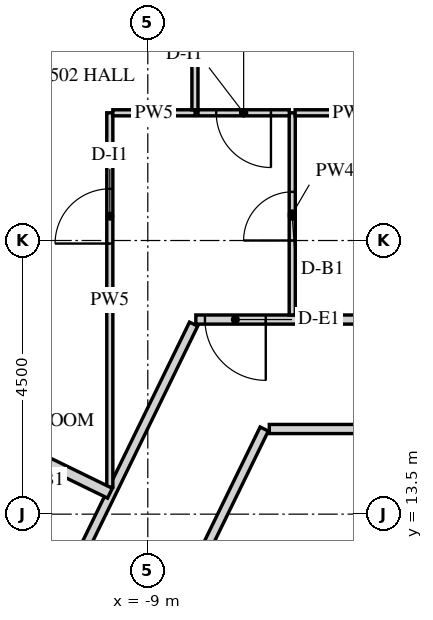
"""IFC4 building model, lengths in metres.
Left out: names, types, materials, properties, quantities, classifications, styles, units other than length and angle.
Written with IfcOpenShell. Run it as: python <this file> out.ifc"""

import sys

from ifc_helpers import new_model, si_unit, direction, frame, frame_2d, origin, place, context, subcontext, project, spatial, rectangle, extrude, element, fill, save


model = new_model("IFC4")
c1 = context("Model", 3, precision=1e-05, world=origin(), true_north=direction((0.0, 1.0)))
c2 = subcontext(c1, "Body", "Model", "MODEL_VIEW")
j1 = project(units=[si_unit("LENGTHUNIT", "METRE"), si_unit("PLANEANGLEUNIT", "RADIAN")], contexts=[c1])
p1 = place(None, origin())
s1 = spatial("IfcSite", under=j1, at=p1, CompositionType="ELEMENT")
p2 = place(p1, origin())
s2 = spatial("IfcBuilding", under=s1, at=p2, CompositionType="ELEMENT")
p3 = place(p2, frame((0.0, 0.0, 314.7)))
s3 = spatial("IfcBuildingStorey", under=s2, at=p3, CompositionType="ELEMENT", Elevation=314.7)
p4 = place(p3, frame((6.467, 16.7, 0.0), z_axis=(0.0, 0.0, 1.0), x_axis=(-1.0, 0.0, 0.0)))
e1 = element("IfcWall", 1, at=p4, inside=s3, PredefinedType="PARTITIONING", context=c2, shape_type="SweptSolid", body=[
    extrude(rectangle(XDim=14.677, YDim=0.15, at=frame_2d((7.339, 0.0))), origin(), (0.0, 0.0, 1.0), 2.988),
])
p5 = place(p4, frame((0.4, 0.0, 0.0)))
e2 = element("IfcOpeningElement", 2, at=p5, cuts=e1, PredefinedType="OPENING", context=c2, shape_type="SweptSolid", body=[
    extrude(rectangle(XDim=1.0, YDim=2.1, at=frame_2d((0.5, 1.05))), frame((0.0, 0.085, 0.0), z_axis=(0.0, -1.0, 0.0), x_axis=(1.0, 0.0, 0.0)), (0.0, 0.0, 1.0), 0.17),
])
p6 = place(p4, frame((13.527, 0.0, 0.0)))
e3 = element("IfcOpeningElement", 3, at=p6, cuts=e1, PredefinedType="OPENING", context=c2, shape_type="SweptSolid", body=[
    extrude(rectangle(XDim=1.0, YDim=2.1, at=frame_2d((0.5, 1.05))), frame((0.0, 0.085, 0.0), z_axis=(0.0, -1.0, 0.0), x_axis=(1.0, 0.0, 0.0)), (0.0, 0.0, 1.0), 0.17),
])
p7 = place(p3, frame((-8.247, 16.625, 0.0), z_axis=(0.0, 0.0, 1.0), x_axis=(-0.438381655451, -0.898788920806, 0.0)))
e4 = element("IfcWall", 4, at=p7, inside=s3, PredefinedType="PARTITIONING", context=c2, shape_type="SweptSolid", body=[
    extrude(rectangle(XDim=16.272, YDim=0.15, at=frame_2d((8.136, 0.0))), origin(), (0.0, 0.0, 1.0), 2.988),
])
p8 = place(p7, frame((5.703, 0.0, 0.0)))
e5 = element("IfcOpeningElement", 5, at=p8, cuts=e4, PredefinedType="OPENING", context=c2, shape_type="SweptSolid", body=[
    extrude(rectangle(XDim=1.0, YDim=2.1, at=frame_2d((0.5, 1.05))), frame((0.0, 0.085, 0.0), z_axis=(0.0, -1.0, 0.0), x_axis=(1.0, 0.0, 0.0)), (0.0, 0.0, 1.0), 0.17),
])
p9 = place(p3, frame((-10.717, 7.453, 0.0), z_axis=(0.0, 0.0, 1.0), x_axis=(0.438363251035, 0.898797897273, 0.0)))
e6 = element("IfcWall", 6, at=p9, inside=s3, PredefinedType="PARTITIONING", context=c2, shape_type="SweptSolid", body=[
    extrude(rectangle(XDim=8.285, YDim=0.15, at=frame_2d((4.143, 0.0))), origin(), (0.0, 0.0, 1.0), 2.988),
])
p10 = place(p3, frame((-7.002, 14.9, 0.0), z_axis=(0.0, 0.0, 1.0), x_axis=(1.0, 0.0, 0.0)))
e7 = element("IfcWall", 7, at=p10, inside=s3, PredefinedType="PARTITIONING", context=c2, shape_type="SweptSolid", body=[
    extrude(rectangle(XDim=12.512, YDim=0.15, at=frame_2d((6.256, 0.0))), origin(), (0.0, 0.0, 1.0), 2.988),
])
p11 = place(p10, frame((5.806, 0.0, 0.0)))
e8 = element("IfcOpeningElement", 8, at=p11, cuts=e7, PredefinedType="OPENING", context=c2, shape_type="SweptSolid", body=[
    extrude(rectangle(XDim=0.9, YDim=2.1, at=frame_2d((0.45, 1.05))), frame((0.0, 0.085, 0.0), z_axis=(0.0, -1.0, 0.0), x_axis=(1.0, 0.0, 0.0)), (0.0, 0.0, 1.0), 0.17),
])
p12 = place(p3, frame((-9.625, 13.945, 0.0), z_axis=(0.0, 0.0, 1.0), x_axis=(0.0, 1.0, 0.0)))
e9 = element("IfcWall", 9, at=p12, inside=s3, PredefinedType="PARTITIONING", context=c2, shape_type="SweptSolid", body=[
    extrude(rectangle(XDim=6.155, YDim=0.1, at=frame_2d((3.077, 0.0))), origin(), (0.0, 0.0, 1.0), 2.988),
])
p13 = place(p12, frame((4.005, 0.0, 0.0)))
e10 = element("IfcOpeningElement", 10, at=p13, cuts=e9, PredefinedType="OPENING", context=c2, shape_type="SweptSolid", body=[
    extrude(rectangle(XDim=0.9, YDim=2.1, at=frame_2d((0.45, 1.05))), frame((0.0, 0.06, 0.0), z_axis=(0.0, -1.0, 0.0), x_axis=(1.0, 0.0, 0.0)), (0.0, 0.0, 1.0), 0.12),
])
p14 = place(p3, frame((-9.575, 20.1, 0.0), z_axis=(0.0, 0.0, 1.0), x_axis=(1.0, 0.0, 0.0)))
e11 = element("IfcWall", 11, at=p14, inside=s3, PredefinedType="PARTITIONING", context=c2, shape_type="SweptSolid", body=[
    extrude(rectangle(XDim=1.352, YDim=0.1, at=frame_2d((0.676, 0.0))), origin(), (0.0, 0.0, 1.0), 2.988),
])
p15 = place(p3, frame((-8.225, 20.15, 0.0), z_axis=(0.0, 0.0, 1.0), x_axis=(0.0, 1.0, 0.0)))
e12 = element("IfcWall", 12, at=p15, inside=s3, PredefinedType="PARTITIONING", context=c2, shape_type="SweptSolid", body=[
    extrude(rectangle(XDim=5.35, YDim=0.1, at=frame_2d((2.675, 0.0))), origin(), (0.0, 0.0, 1.0), 2.988),
])
p16 = place(p3, frame((-17.516, 17.694, 0.0), z_axis=(0.0, 0.0, 1.0), x_axis=(0.898787414812, -0.438384743092, 0.0)))
e13 = element("IfcWall", 13, at=p16, inside=s3, PredefinedType="PARTITIONING", context=c2, shape_type="SweptSolid", body=[
    extrude(rectangle(XDim=8.782, YDim=0.18, at=frame_2d((4.391, 0.0))), origin(), (0.0, 0.0, 1.0), 2.988),
])
p17 = place(p3, frame((-6.625, 16.775, 0.0), z_axis=(0.0, 0.0, 1.0), x_axis=(0.0, 1.0, 0.0)))
e14 = element("IfcWall", 14, at=p17, inside=s3, PredefinedType="PARTITIONING", context=c2, shape_type="SweptSolid", body=[
    extrude(rectangle(XDim=3.325, YDim=0.1, at=frame_2d((1.663, 0.0))), origin(), (0.0, 0.0, 1.0), 2.988),
])
p18 = place(p17, frame((1.225, 0.0, 0.0)))
e15 = element("IfcOpeningElement", 15, at=p18, cuts=e14, PredefinedType="OPENING", context=c2, shape_type="SweptSolid", body=[
    extrude(rectangle(XDim=0.8, YDim=2.1, at=frame_2d((0.4, 1.05))), frame((0.0, 0.06, 0.0), z_axis=(0.0, -1.0, 0.0), x_axis=(1.0, 0.0, 0.0)), (0.0, 0.0, 1.0), 0.12),
])
p19 = place(p3, frame((-6.673, 20.1, 0.0), z_axis=(0.0, 0.0, 1.0), x_axis=(-1.0, 0.0, 0.0)))
e16 = element("IfcWall", 16, at=p19, inside=s3, PredefinedType="PARTITIONING", context=c2, shape_type="SweptSolid", body=[
    extrude(rectangle(XDim=1.502, YDim=0.1, at=frame_2d((0.751, 0.0))), origin(), (0.0, 0.0, 1.0), 2.988),
])
p20 = place(p19, frame((0.302, 0.0, 0.0)))
e17 = element("IfcOpeningElement", 17, at=p20, cuts=e16, PredefinedType="OPENING", context=c2, shape_type="SweptSolid", body=[
    extrude(rectangle(XDim=0.9, YDim=2.1, at=frame_2d((0.45, 1.05))), frame((0.0, 0.06, 0.0), z_axis=(0.0, -1.0, 0.0), x_axis=(1.0, 0.0, 0.0)), (0.0, 0.0, 1.0), 0.12),
])
p21 = place(p3, frame((-4.715, 20.1, 0.0), z_axis=(0.0, 0.0, 1.0), x_axis=(-1.0, 0.0, 0.0)))
e18 = element("IfcWall", 18, at=p21, inside=s3, PredefinedType="PARTITIONING", context=c2, shape_type="SweptSolid", body=[
    extrude(rectangle(XDim=1.862, YDim=0.1, at=frame_2d((0.931, 0.0))), origin(), (0.0, 0.0, 1.0), 2.988),
])
p22 = place(p3, frame((-10.551, 12.072, 0.0), z_axis=(0.0, 0.0, 1.0), x_axis=(-0.898803726577, 0.438351298723, 0.0)))
e19 = element("IfcWall", 19, at=p22, inside=s3, PredefinedType="PARTITIONING", context=c2, shape_type="SweptSolid", body=[
    extrude(rectangle(XDim=3.325, YDim=0.1, at=frame_2d((1.663, 0.0))), origin(), (0.0, 0.0, 1.0), 2.988),
])
p23 = place(p22, frame((1.225, 0.0, 0.0)))
e20 = element("IfcOpeningElement", 20, at=p23, cuts=e19, PredefinedType="OPENING", context=c2, shape_type="SweptSolid", body=[
    extrude(rectangle(XDim=0.8, YDim=2.1, at=frame_2d((0.4, 1.05))), frame((0.0, 0.06, 0.0), z_axis=(0.0, -1.0, 0.0), x_axis=(1.0, 0.0, 0.0)), (0.0, 0.0, 1.0), 0.12),
])
p24 = place(p6, origin())
e21 = element("IfcDoor", 21, at=p24, inside=s3, OperationType="SINGLE_SWING_LEFT", PredefinedType="DOOR", context=c2, shape_type="SweptSolid", body=[
    extrude(rectangle(XDim=1.0, YDim=2.1, at=frame_2d((0.5, 1.05))), frame((0.0, 0.025, 0.0), z_axis=(0.0, -1.0, 0.0), x_axis=(1.0, 0.0, 0.0)), (0.0, 0.0, 1.0), 0.05),
])
fill(e3, e21)
p25 = place(p18, origin())
e22 = element("IfcDoor", 22, at=p25, inside=s3, OperationType="SINGLE_SWING_RIGHT", PredefinedType="DOOR", context=c2, shape_type="SweptSolid", body=[
    extrude(rectangle(XDim=0.8, YDim=2.1, at=frame_2d((0.4, 1.05))), frame((0.0, 0.025, 0.0), z_axis=(0.0, -1.0, 0.0), x_axis=(1.0, 0.0, 0.0)), (0.0, 0.0, 1.0), 0.05),
])
fill(e15, e22)
p26 = place(p13, origin())
e23 = element("IfcDoor", 23, at=p26, inside=s3, OperationType="SINGLE_SWING_LEFT", PredefinedType="DOOR", context=c2, shape_type="SweptSolid", body=[
    extrude(rectangle(XDim=0.9, YDim=2.1, at=frame_2d((0.45, 1.05))), frame((0.0, 0.025, 0.0), z_axis=(0.0, -1.0, 0.0), x_axis=(1.0, 0.0, 0.0)), (0.0, 0.0, 1.0), 0.05),
])
fill(e10, e23)
p27 = place(p20, origin())
e24 = element("IfcDoor", 24, at=p27, inside=s3, OperationType="SINGLE_SWING_RIGHT", PredefinedType="DOOR", context=c2, shape_type="SweptSolid", body=[
    extrude(rectangle(XDim=0.9, YDim=2.1, at=frame_2d((0.45, 1.05))), frame((0.0, 0.025, 0.0), z_axis=(0.0, -1.0, 0.0), x_axis=(1.0, 0.0, 0.0)), (0.0, 0.0, 1.0), 0.05),
])
fill(e17, e24)
save(model, sys.argv[1])
